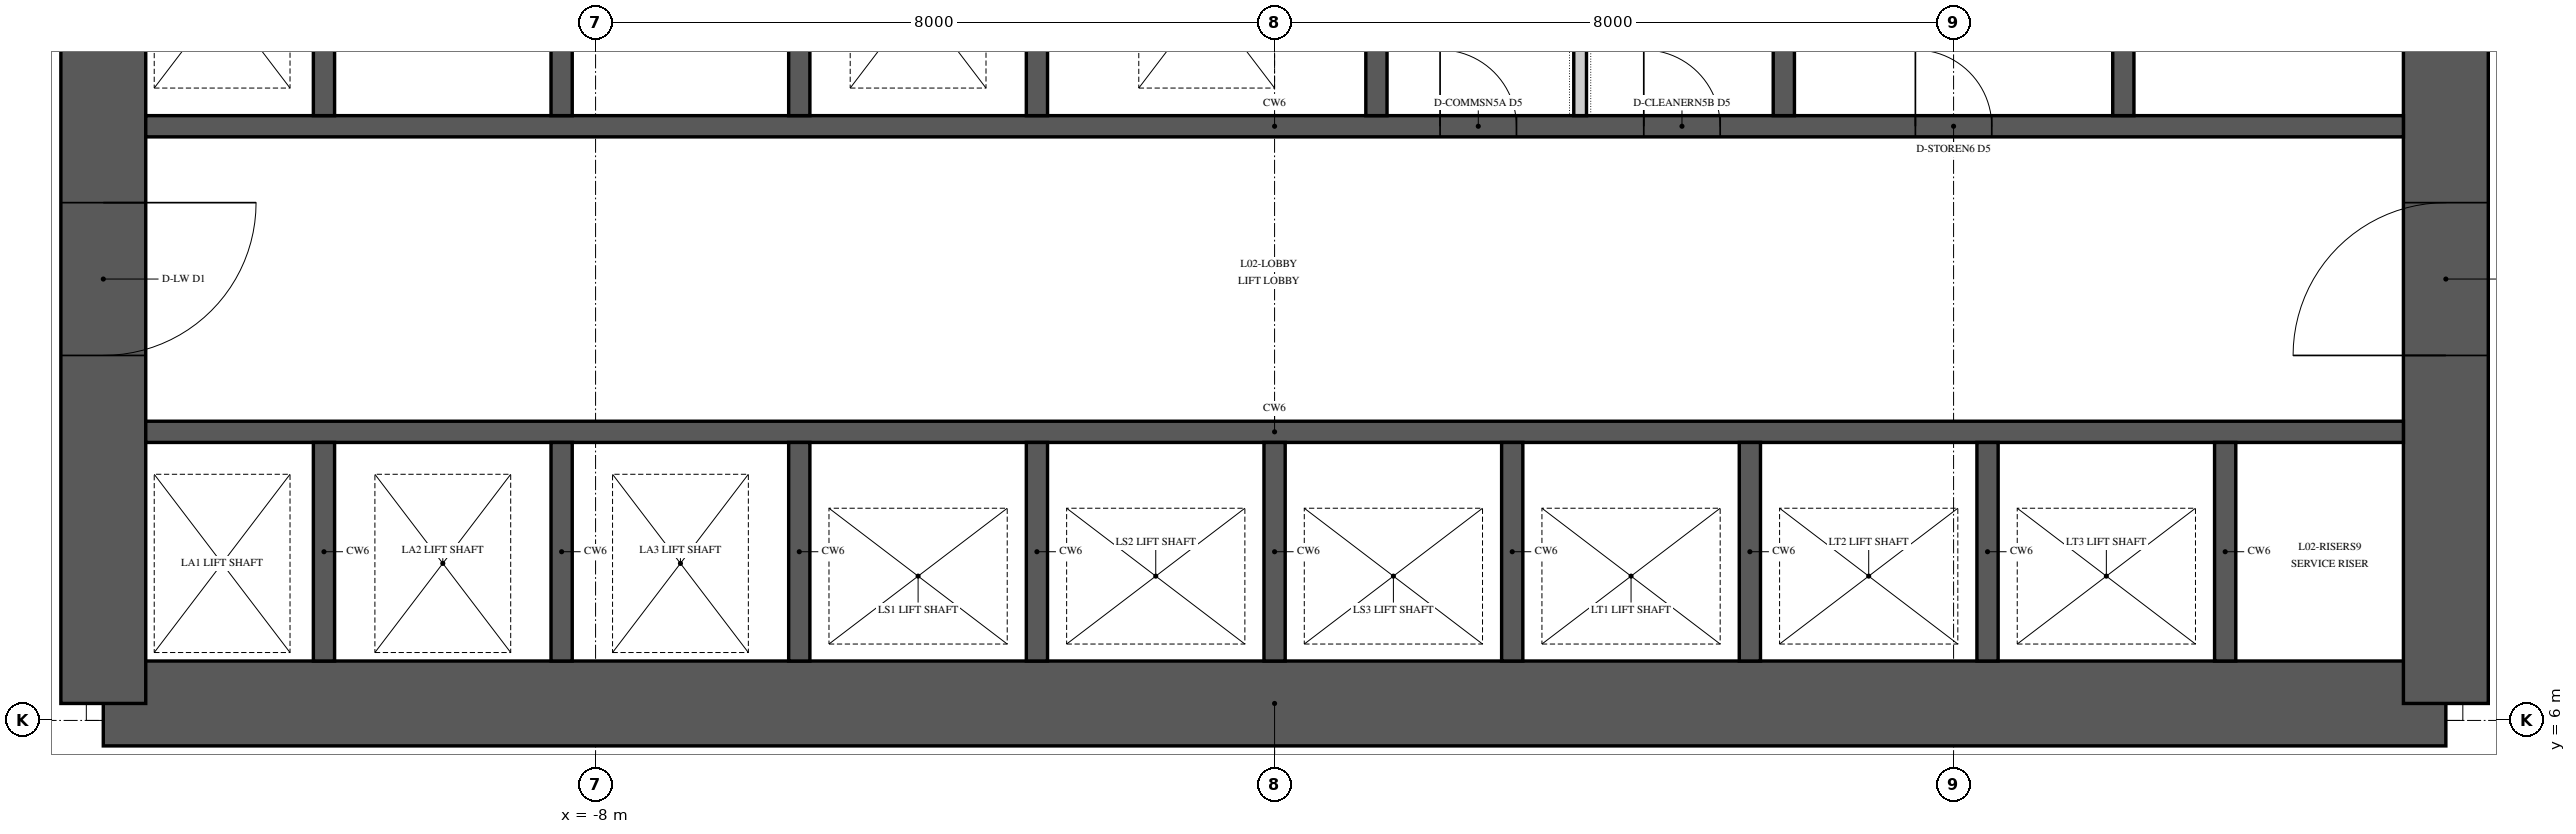
"""IFC4 building model, lengths in metres.
Left out: names, types, materials, properties, quantities, classifications, styles, units other than length and angle.
Written with IfcOpenShell. Run it as: python <this file> out.ifc"""

import sys

from ifc_helpers import new_model, si_unit, direction, frame, frame_2d, origin, place, context, subcontext, project, spatial, polyline, rectangle, outline, extrude, element, fill, save


model = new_model("IFC4")
c1 = context("Model", 3, precision=1e-05, world=origin(), true_north=direction((0.0, 1.0)))
c2 = subcontext(c1, "Body", "Model", "MODEL_VIEW")
j1 = project(units=[si_unit("LENGTHUNIT", "METRE"), si_unit("PLANEANGLEUNIT", "RADIAN")], contexts=[c1])
p1 = place(None, origin())
s1 = spatial("IfcSite", under=j1, at=p1, CompositionType="ELEMENT")
p2 = place(p1, origin())
s2 = spatial("IfcBuilding", under=s1, at=p2, CompositionType="ELEMENT")
p3 = place(p2, frame((0.0, 0.0, 12.0)))
s3 = spatial("IfcBuildingStorey", under=s2, at=p3, CompositionType="ELEMENT", Elevation=12.0)
p4 = place(p3, frame((-13.8, 6.2, 0.0), z_axis=(0.0, 0.0, 1.0), x_axis=(1.0, 0.0, 0.0)))
e1 = element("IfcWall", 1, at=p4, inside=s3, PredefinedType="SHEAR", context=c2, shape_type="SweptSolid", body=[
    extrude(rectangle(XDim=27.6, YDim=1.0, at=frame_2d((13.8, 0.0))), origin(), (0.0, 0.0, 1.0), 7.0),
])
p5 = place(p3, frame((13.8, 6.2, 0.0), z_axis=(0.0, 0.0, 1.0), x_axis=(0.0, 1.0, 0.0)))
e2 = element("IfcWall", 2, at=p5, inside=s3, PredefinedType="SHEAR", context=c2, shape_type="SweptSolid", body=[
    extrude(outline(polyline([(0.0, -0.5), (17.6, -0.5), (17.6, 0.0), (17.1, 0.0), (17.1, 0.5), (0.5, 0.5), (0.5, 0.0), (0.0, 0.0), (0.0, -0.5)])), origin(), (0.0, 0.0, 1.0), 7.0),
])
p6 = place(p5, frame((4.1, 0.0, 0.0)))
e3 = element("IfcOpeningElement", 3, at=p6, cuts=e2, PredefinedType="OPENING", context=c2, shape_type="SweptSolid", body=[
    extrude(rectangle(XDim=1.8, YDim=2.4, at=frame_2d((0.9, 1.2))), frame((0.0, 0.515, 0.0), z_axis=(0.0, -1.0, 0.0), x_axis=(1.0, 0.0, 0.0)), (0.0, 0.0, 1.0), 1.03),
])
p7 = place(p3, frame((-13.8, 23.8, 0.0), z_axis=(0.0, 0.0, 1.0), x_axis=(0.0, -1.0, 0.0)))
e4 = element("IfcWall", 4, at=p7, inside=s3, PredefinedType="SHEAR", context=c2, shape_type="SweptSolid", body=[
    extrude(outline(polyline([(0.0, -0.5), (17.6, -0.5), (17.6, 0.0), (17.1, 0.0), (17.1, 0.5), (0.5, 0.5), (0.5, 0.0), (0.0, 0.0), (0.0, -0.5)])), origin(), (0.0, 0.0, 1.0), 7.0),
])
p8 = place(p7, frame((11.7, 0.0, 0.0)))
e5 = element("IfcOpeningElement", 5, at=p8, cuts=e4, PredefinedType="OPENING", context=c2, shape_type="SweptSolid", body=[
    extrude(rectangle(XDim=1.8, YDim=2.4, at=frame_2d((0.9, 1.2))), frame((0.0, 0.515, 0.0), z_axis=(0.0, -1.0, 0.0), x_axis=(1.0, 0.0, 0.0)), (0.0, 0.0, 1.0), 1.03),
])
p9 = place(p3, frame((-13.3, 9.4, 0.0), z_axis=(0.0, 0.0, 1.0), x_axis=(1.0, 0.0, 0.0)))
e6 = element("IfcWall", 6, at=p9, inside=s3, PredefinedType="SHEAR", context=c2, shape_type="SweptSolid", body=[
    extrude(rectangle(XDim=26.6, YDim=0.25, at=frame_2d((13.3, 0.0))), origin(), (0.0, 0.0, 1.0), 7.0),
])
p10 = place(p3, frame((-13.3, 13.0, 0.0), z_axis=(0.0, 0.0, 1.0), x_axis=(1.0, 0.0, 0.0)))
e7 = element("IfcWall", 7, at=p10, inside=s3, PredefinedType="SHEAR", context=c2, shape_type="SweptSolid", body=[
    extrude(rectangle(XDim=26.6, YDim=0.25, at=frame_2d((13.3, 0.0))), origin(), (0.0, 0.0, 1.0), 7.0),
])
p11 = place(p10, frame((15.25, 0.0, 0.0)))
e8 = element("IfcOpeningElement", 8, at=p11, cuts=e7, PredefinedType="OPENING", context=c2, shape_type="SweptSolid", body=[
    extrude(rectangle(XDim=0.9, YDim=2.1, at=frame_2d((0.45, 1.05))), frame((0.0, 0.14, 0.0), z_axis=(0.0, -1.0, 0.0), x_axis=(1.0, 0.0, 0.0)), (0.0, 0.0, 1.0), 0.28),
])
p12 = place(p10, frame((17.65, 0.0, 0.0)))
e9 = element("IfcOpeningElement", 9, at=p12, cuts=e7, PredefinedType="OPENING", context=c2, shape_type="SweptSolid", body=[
    extrude(rectangle(XDim=0.9, YDim=2.1, at=frame_2d((0.45, 1.05))), frame((0.0, 0.14, 0.0), z_axis=(0.0, -1.0, 0.0), x_axis=(1.0, 0.0, 0.0)), (0.0, 0.0, 1.0), 0.28),
])
p13 = place(p10, frame((20.85, 0.0, 0.0)))
e10 = element("IfcOpeningElement", 10, at=p13, cuts=e7, PredefinedType="OPENING", context=c2, shape_type="SweptSolid", body=[
    extrude(rectangle(XDim=0.9, YDim=2.1, at=frame_2d((0.45, 1.05))), frame((0.0, 0.14, 0.0), z_axis=(0.0, -1.0, 0.0), x_axis=(1.0, 0.0, 0.0)), (0.0, 0.0, 1.0), 0.28),
])
for number, where, z_axis, x_axis in (
    (11, (-11.2, 6.7, 0.0), (0.0, 0.0, 1.0), (0.0, 1.0, 0.0)),
    (12, (-8.4, 6.7, 0.0), (0.0, 0.0, 1.0), (0.0, 1.0, 0.0)),
    (13, (-5.6, 6.7, 0.0), (0.0, 0.0, 1.0), (0.0, 1.0, 0.0)),
    (14, (-2.8, 6.7, 0.0), (0.0, 0.0, 1.0), (0.0, 1.0, 0.0)),
    (15, (0.0, 6.7, 0.0), (0.0, 0.0, 1.0), (0.0, 1.0, 0.0)),
    (16, (2.8, 6.7, 0.0), (0.0, 0.0, 1.0), (0.0, 1.0, 0.0)),
    (17, (5.6, 6.7, 0.0), (0.0, 0.0, 1.0), (0.0, 1.0, 0.0)),
    (18, (8.4, 6.7, 0.0), (0.0, 0.0, 1.0), (0.0, 1.0, 0.0)),
    (19, (11.2, 6.7, 0.0), (0.0, 0.0, 1.0), (0.0, 1.0, 0.0)),
):
    element("IfcWall", number, at=place(p3, frame(where, z_axis=z_axis, x_axis=x_axis)), inside=s3, PredefinedType="SHEAR", context=c2, shape_type="SweptSolid", body=[
        extrude(rectangle(XDim=2.575, YDim=0.25, at=frame_2d((1.288, 0.0))), origin(), (0.0, 0.0, 1.0), 7.0),
    ])
for number, where, z_axis, x_axis in (
    (20, (-11.2, 13.125, 0.0), (0.0, 0.0, 1.0), (0.0, 1.0, 0.0)),
    (21, (-8.4, 13.125, 0.0), (0.0, 0.0, 1.0), (0.0, 1.0, 0.0)),
    (22, (-5.6, 13.125, 0.0), (0.0, 0.0, 1.0), (0.0, 1.0, 0.0)),
    (23, (-2.8, 13.125, 0.0), (0.0, 0.0, 1.0), (0.0, 1.0, 0.0)),
    (24, (1.2, 13.125, 0.0), (0.0, 0.0, 1.0), (0.0, 1.0, 0.0)),
    (25, (6.0, 13.125, 0.0), (0.0, 0.0, 1.0), (0.0, 1.0, 0.0)),
    (26, (10.0, 13.125, 0.0), (0.0, 0.0, 1.0), (0.0, 1.0, 0.0)),
):
    element("IfcWall", number, at=place(p3, frame(where, z_axis=z_axis, x_axis=x_axis)), inside=s3, PredefinedType="SHEAR", context=c2, shape_type="SweptSolid", body=[
        extrude(rectangle(XDim=2.75, YDim=0.25, at=frame_2d((1.375, 0.0))), origin(), (0.0, 0.0, 1.0), 7.0),
    ])
p14 = place(p3, frame((3.6, 13.125, 0.0), z_axis=(0.0, 0.0, 1.0), x_axis=(0.0, 1.0, 0.0)))
e27 = element("IfcWall", 27, at=p14, inside=s3, PredefinedType="PARTITIONING", context=c2, shape_type="SweptSolid", body=[
    extrude(rectangle(XDim=2.75, YDim=0.15, at=frame_2d((1.375, 0.0))), origin(), (0.0, 0.0, 1.0), 6.85),
])
p15 = place(p6, origin())
e28 = element("IfcDoor", 28, at=p15, inside=s3, OperationType="DOUBLE_DOOR_SINGLE_SWING", PredefinedType="DOOR", context=c2, shape_type="SweptSolid", body=[
    extrude(rectangle(XDim=1.8, YDim=2.4, at=frame_2d((0.9, 1.2))), frame((0.0, 0.5, 0.0), z_axis=(0.0, -1.0, 0.0), x_axis=(1.0, 0.0, 0.0)), (0.0, 0.0, 1.0), 1.0),
])
fill(e3, e28)
p16 = place(p8, origin())
e29 = element("IfcDoor", 29, at=p16, inside=s3, OperationType="DOUBLE_DOOR_SINGLE_SWING", PredefinedType="DOOR", context=c2, shape_type="SweptSolid", body=[
    extrude(rectangle(XDim=1.8, YDim=2.4, at=frame_2d((0.9, 1.2))), frame((0.0, 0.5, 0.0), z_axis=(0.0, -1.0, 0.0), x_axis=(1.0, 0.0, 0.0)), (0.0, 0.0, 1.0), 1.0),
])
fill(e5, e29)
p17 = place(p11, origin())
e30 = element("IfcDoor", 30, at=p17, inside=s3, OperationType="SINGLE_SWING_LEFT", PredefinedType="DOOR", context=c2, shape_type="SweptSolid", body=[
    extrude(rectangle(XDim=0.9, YDim=2.1, at=frame_2d((0.45, 1.05))), frame((0.0, 0.125, 0.0), z_axis=(0.0, -1.0, 0.0), x_axis=(1.0, 0.0, 0.0)), (0.0, 0.0, 1.0), 0.25),
])
fill(e8, e30)
p18 = place(p12, origin())
e31 = element("IfcDoor", 31, at=p18, inside=s3, OperationType="SINGLE_SWING_LEFT", PredefinedType="DOOR", context=c2, shape_type="SweptSolid", body=[
    extrude(rectangle(XDim=0.9, YDim=2.1, at=frame_2d((0.45, 1.05))), frame((0.0, 0.125, 0.0), z_axis=(0.0, -1.0, 0.0), x_axis=(1.0, 0.0, 0.0)), (0.0, 0.0, 1.0), 0.25),
])
fill(e9, e31)
p19 = place(p13, origin())
e32 = element("IfcDoor", 32, at=p19, inside=s3, OperationType="SINGLE_SWING_LEFT", PredefinedType="DOOR", context=c2, shape_type="SweptSolid", body=[
    extrude(rectangle(XDim=0.9, YDim=2.1, at=frame_2d((0.45, 1.05))), frame((0.0, 0.125, 0.0), z_axis=(0.0, -1.0, 0.0), x_axis=(1.0, 0.0, 0.0)), (0.0, 0.0, 1.0), 0.25),
])
fill(e10, e32)
save(model, sys.argv[1])
